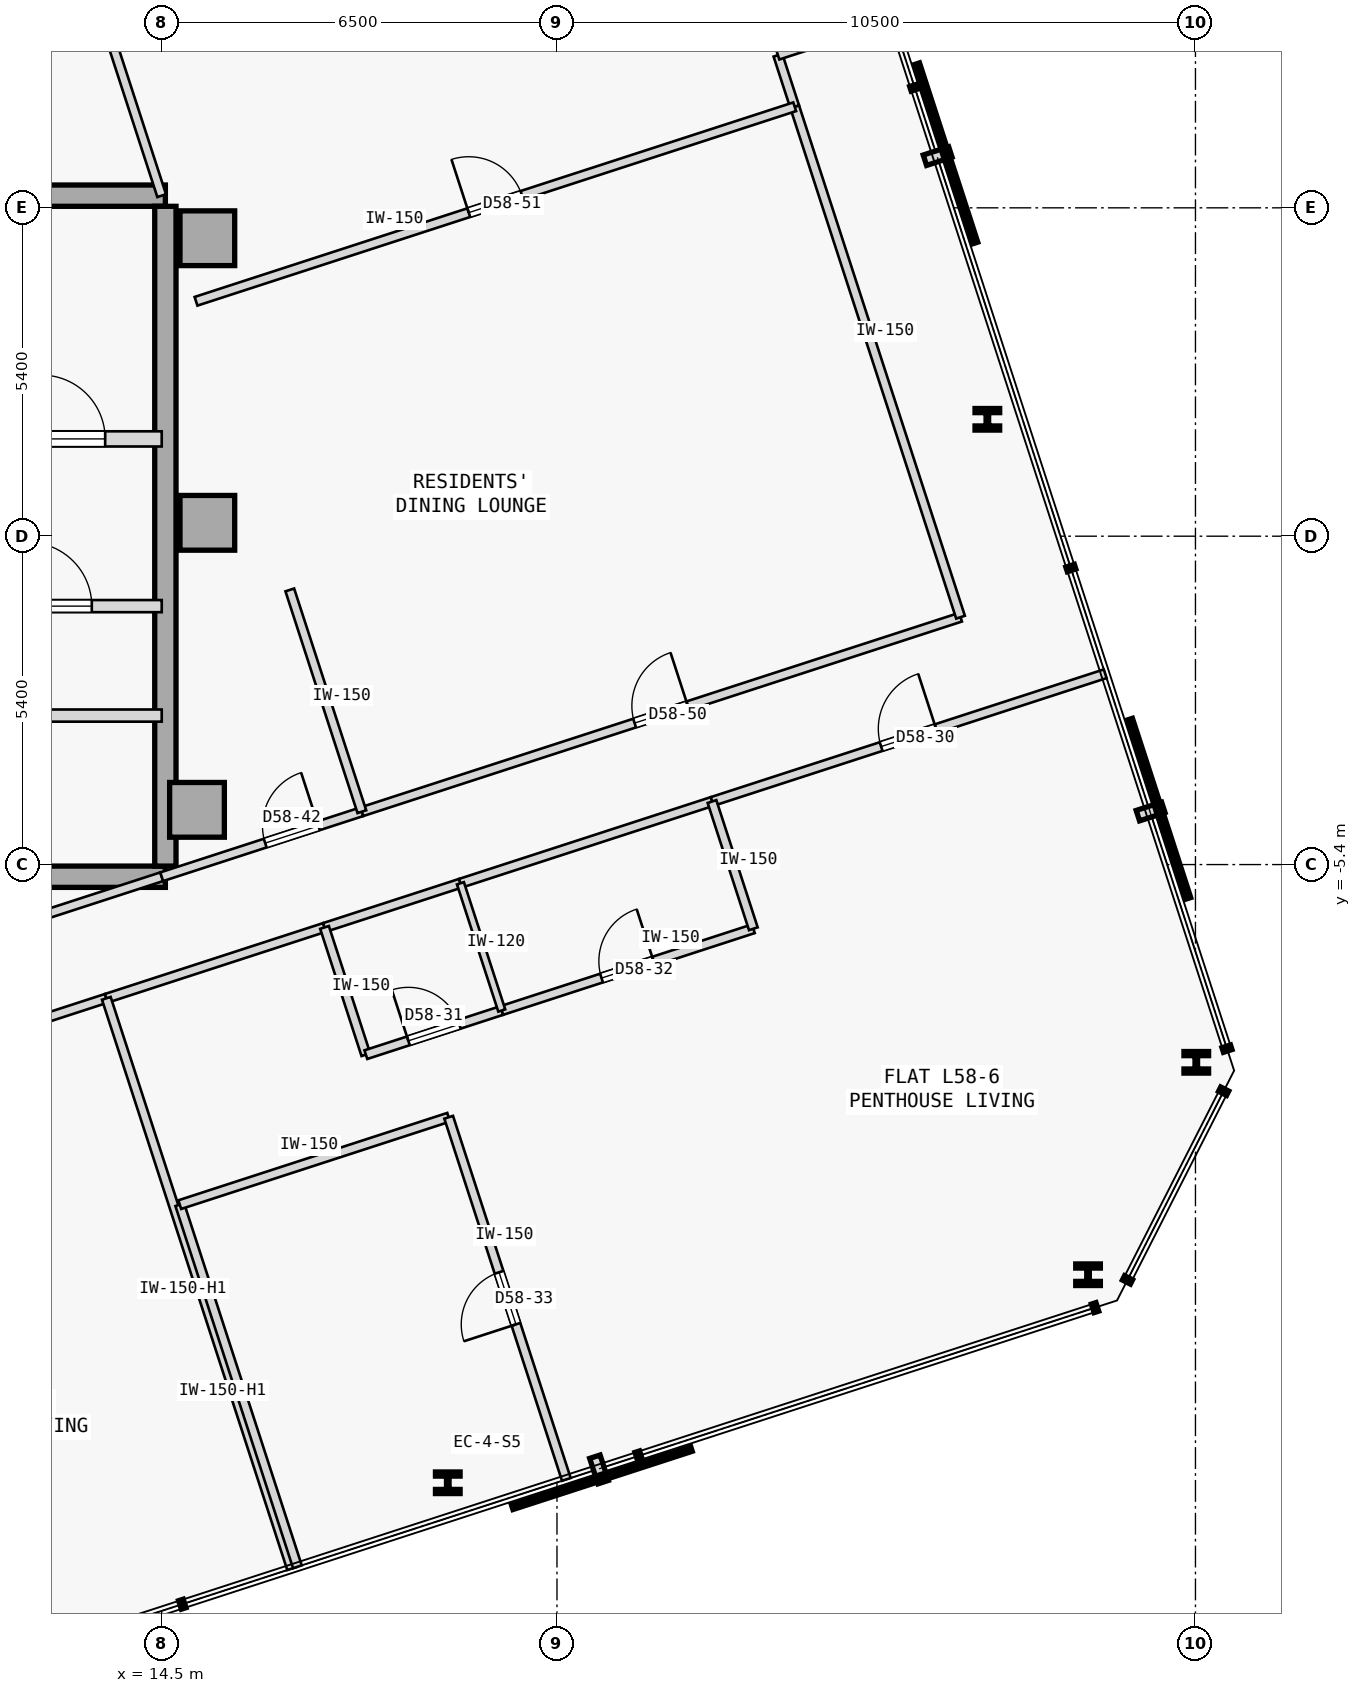
"""IFC4 building model, lengths in metres.
Left out: names, types, materials, properties, quantities, classifications, styles, units other than length and angle.
Written with IfcOpenShell. Run it as: python <this file> out.ifc"""

import sys

from ifc_helpers import new_model, si_unit, direction, frame, frame_2d, origin, origin_2d, place, context, subcontext, project, spatial, rectangle, i_section, extrude, element, fill, save


model = new_model("IFC4")
c1 = context("Model", 3, precision=1e-05, world=origin(), true_north=direction((0.0, 1.0)))
c2 = subcontext(c1, "Body", "Model", "MODEL_VIEW")
j1 = project(units=[si_unit("LENGTHUNIT", "METRE"), si_unit("PLANEANGLEUNIT", "RADIAN")], contexts=[c1])
p1 = place(None, origin())
s1 = spatial("IfcSite", under=j1, at=p1, CompositionType="ELEMENT")
p2 = place(p1, origin())
s2 = spatial("IfcBuilding", under=s1, at=p2, CompositionType="ELEMENT")
p3 = place(p2, frame((0.0, 0.0, 220.95)))
s3 = spatial("IfcBuildingStorey", under=s2, at=p3, CompositionType="ELEMENT", Elevation=220.95)
for number, where, z_axis, x_axis in (
    (1, (15.25, 4.9, 0.0), (0.0, 0.0, 1.0), (1.0, 0.0, 0.0)),
    (2, (15.25, 0.22, 0.0), (0.0, 0.0, 1.0), (1.0, 0.0, 0.0)),
    (3, (15.08, -4.5, 0.0), (0.0, 0.0, 1.0), (1.0, 0.0, 0.0)),
):
    element("IfcColumn", number, at=place(p3, frame(where, z_axis=z_axis, x_axis=x_axis)), inside=s3, PredefinedType="COLUMN", context=c2, shape_type="SweptSolid", body=[
        extrude(rectangle(XDim=0.9, YDim=0.9, at=origin_2d()), origin(), (0.0, 0.0, 1.0), 3.35),
    ])
p4 = place(p3, frame((3.15, 5.6, 0.0), z_axis=(0.0, 0.0, 1.0), x_axis=(1.0, 0.0, 0.0)))
e4 = element("IfcWall", 4, at=p4, inside=s3, PredefinedType="SHEAR", context=c2, shape_type="SweptSolid", body=[
    extrude(rectangle(XDim=11.41, YDim=0.35, at=frame_2d((5.705, 0.0))), origin(), (0.0, 0.0, 1.0), 3.125),
])
p5 = place(p3, frame((3.7, -5.6, 0.0), z_axis=(0.0, 0.0, 1.0), x_axis=(1.0, 0.0, 0.0)))
e5 = element("IfcWall", 5, at=p5, inside=s3, PredefinedType="SHEAR", context=c2, shape_type="SweptSolid", body=[
    extrude(rectangle(XDim=10.86, YDim=0.35, at=frame_2d((5.43, 0.0))), origin(), (0.0, 0.0, 1.0), 3.125),
])
p6 = place(p3, frame((14.56, -5.425, 0.0), z_axis=(0.0, 0.0, 1.0), x_axis=(0.0, 1.0, 0.0)))
e6 = element("IfcWall", 6, at=p6, inside=s3, PredefinedType="SHEAR", context=c2, shape_type="SweptSolid", body=[
    extrude(rectangle(XDim=10.85, YDim=0.35, at=frame_2d((5.425, 0.0))), origin(), (0.0, 0.0, 1.0), 3.125),
])
for number, where, z_axis, x_axis in (
    (7, (19.204, -15.566, 0.0), (0.0, 0.0, 1.0), (1.0, 0.0, 0.0)),
    (8, (29.734, -12.145, 0.0), (0.0, 0.0, 1.0), (1.0, 0.0, 0.0)),
    (9, (31.513, -8.652, 0.0), (0.0, 0.0, 1.0), (1.0, 0.0, 0.0)),
    (10, (28.078, 1.922, 0.0), (0.0, 0.0, 1.0), (1.0, 0.0, 0.0)),
):
    element("IfcColumn", number, at=place(p3, frame(where, z_axis=z_axis, x_axis=x_axis)), inside=s3, PredefinedType="COLUMN", context=c2, shape_type="SweptSolid", body=[
        extrude(i_section(OverallWidth=0.405, OverallDepth=0.355, WebThickness=0.042, FlangeThickness=0.068, FilletRadius=0.015, at=origin_2d()), origin(), (0.0, 0.0, 1.0), 3.35),
    ])
p7 = place(p3, frame((10.9, 1.6, 0.0), z_axis=(0.0, 0.0, 1.0), x_axis=(1.0, 0.0, 0.0)))
e11 = element("IfcWall", 11, at=p7, inside=s3, PredefinedType="STANDARD", context=c2, shape_type="SweptSolid", body=[
    extrude(rectangle(XDim=3.6, YDim=0.25, at=frame_2d((1.8, 0.0))), origin(), (0.0, 0.0, 1.0), 3.125),
])
p8 = place(p7, frame((1.62, 0.0, 0.0)))
e12 = element("IfcOpeningElement", 12, at=p8, cuts=e11, PredefinedType="OPENING", context=c2, shape_type="SweptSolid", body=[
    extrude(rectangle(XDim=1.05, YDim=2.15, at=frame_2d((0.525, 1.075))), frame((0.0, 0.135, 0.0), z_axis=(0.0, -1.0, 0.0), x_axis=(1.0, 0.0, 0.0)), (0.0, 0.0, 1.0), 0.27),
])
p9 = place(p3, frame((11.55, -1.15, 0.0), z_axis=(0.0, 0.0, 1.0), x_axis=(1.0, 0.0, 0.0)))
e13 = element("IfcWall", 13, at=p9, inside=s3, PredefinedType="STANDARD", context=c2, shape_type="SweptSolid", body=[
    extrude(rectangle(XDim=2.95, YDim=0.2, at=frame_2d((1.475, 0.0))), origin(), (0.0, 0.0, 1.0), 3.125),
])
p10 = place(p9, frame((0.75, 0.0, 0.0)))
e14 = element("IfcOpeningElement", 14, at=p10, cuts=e13, PredefinedType="OPENING", context=c2, shape_type="SweptSolid", body=[
    extrude(rectangle(XDim=1.05, YDim=2.18, at=frame_2d((0.525, 1.09))), frame((0.0, 0.11, 0.0), z_axis=(0.0, -1.0, 0.0), x_axis=(1.0, 0.0, 0.0)), (0.0, 0.0, 1.0), 0.22),
])
p11 = place(p3, frame((3.7, -2.95, 0.0), z_axis=(0.0, 0.0, 1.0), x_axis=(1.0, 0.0, 0.0)))
e15 = element("IfcWall", 15, at=p11, inside=s3, PredefinedType="STANDARD", context=c2, shape_type="SweptSolid", body=[
    extrude(rectangle(XDim=10.8, YDim=0.2, at=frame_2d((5.4, 0.0))), origin(), (0.0, 0.0, 1.0), 3.125),
])
p12 = place(p11, frame((0.53, 0.0, 0.0)))
e16 = element("IfcOpeningElement", 16, at=p12, cuts=e15, PredefinedType="OPENING", context=c2, shape_type="SweptSolid", body=[
    extrude(rectangle(XDim=1.1, YDim=2.15, at=frame_2d((0.55, 1.075))), frame((0.0, 0.11, 0.0), z_axis=(0.0, -1.0, 0.0), x_axis=(1.0, 0.0, 0.0)), (0.0, 0.0, 1.0), 0.22),
])
p13 = place(p11, frame((6.02, 0.0, 0.0)))
e17 = element("IfcOpeningElement", 17, at=p13, cuts=e15, PredefinedType="OPENING", context=c2, shape_type="SweptSolid", body=[
    extrude(rectangle(XDim=0.92, YDim=2.15, at=frame_2d((0.46, 1.075))), frame((0.0, 0.11, 0.0), z_axis=(0.0, -1.0, 0.0), x_axis=(1.0, 0.0, 0.0)), (0.0, 0.0, 1.0), 0.22),
])
p14 = place(p3, frame((8.744, -9.174, 0.0), z_axis=(0.0, 0.0, 1.0), x_axis=(0.95105238152, 0.309029719615, 0.0)))
e18 = element("IfcWall", 18, at=p14, inside=s3, PredefinedType="PARTITIONING", context=c2, shape_type="SweptSolid", body=[
    extrude(rectangle(XDim=5.094, YDim=0.15, at=frame_2d((2.547, 0.0))), origin(), (0.0, 0.0, 1.0), 3.125),
])
p15 = place(p14, frame((2.072, 0.0, 0.0)))
e19 = element("IfcOpeningElement", 19, at=p15, cuts=e18, PredefinedType="OPENING", context=c2, shape_type="SweptSolid", body=[
    extrude(rectangle(XDim=0.95, YDim=2.15, at=frame_2d((0.475, 1.075))), frame((0.0, 0.085, 0.0), z_axis=(0.0, -1.0, 0.0), x_axis=(1.0, 0.0, 0.0)), (0.0, 0.0, 1.0), 0.17),
])
p16 = place(p3, frame((13.589, -7.6, 0.0), z_axis=(0.0, 0.0, 1.0), x_axis=(0.95105023481, 0.30903632613, 0.0)))
e20 = element("IfcWall", 20, at=p16, inside=s3, PredefinedType="PARTITIONING", context=c2, shape_type="SweptSolid", body=[
    extrude(rectangle(XDim=3.773, YDim=0.15, at=frame_2d((1.886, 0.0))), origin(), (0.0, 0.0, 1.0), 3.125),
])
p17 = place(p3, frame((23.549, -4.363, 0.0), z_axis=(0.0, 0.0, 1.0), x_axis=(0.951054649174, 0.309022740723, 0.0)))
e21 = element("IfcWall", 21, at=p17, inside=s3, PredefinedType="PARTITIONING", context=c2, shape_type="SweptSolid", body=[
    extrude(rectangle(XDim=6.799, YDim=0.15, at=frame_2d((3.399, 0.0))), origin(), (0.0, 0.0, 1.0), 3.125),
])
p18 = place(p17, frame((2.925, 0.0, 0.0)))
e22 = element("IfcOpeningElement", 22, at=p18, cuts=e21, PredefinedType="OPENING", context=c2, shape_type="SweptSolid", body=[
    extrude(rectangle(XDim=0.95, YDim=2.15, at=frame_2d((0.475, 1.075))), frame((0.0, 0.085, 0.0), z_axis=(0.0, -1.0, 0.0), x_axis=(1.0, 0.0, 0.0)), (0.0, 0.0, 1.0), 0.17),
])
p19 = place(p3, frame((17.177, -6.434, 0.0), z_axis=(0.0, 0.0, 1.0), x_axis=(0.951066131077, 0.308987401554, 0.0)))
e23 = element("IfcWall", 23, at=p19, inside=s3, PredefinedType="PARTITIONING", context=c2, shape_type="SweptSolid", body=[
    extrude(rectangle(XDim=2.35, YDim=0.15, at=frame_2d((1.175, 0.0))), origin(), (0.0, 0.0, 1.0), 3.125),
])
p20 = place(p3, frame((19.412, -5.708, 0.0), z_axis=(0.0, 0.0, 1.0), x_axis=(0.951057987102, 0.309012467661, 0.0)))
e24 = element("IfcWall", 24, at=p20, inside=s3, PredefinedType="PARTITIONING", context=c2, shape_type="SweptSolid", body=[
    extrude(rectangle(XDim=4.35, YDim=0.15, at=frame_2d((2.175, 0.0))), origin(), (0.0, 0.0, 1.0), 3.125),
])
p21 = place(p3, frame((7.588, -7.846, 0.0), z_axis=(0.0, 0.0, 1.0), x_axis=(0.951058013903, 0.309012385174, 0.0)))
e25 = element("IfcWall", 25, at=p21, inside=s3, PredefinedType="PARTITIONING", context=c2, shape_type="SweptSolid", body=[
    extrude(rectangle(XDim=7.267, YDim=0.15, at=frame_2d((3.634, 0.0))), origin(), (0.0, 0.0, 1.0), 3.125),
])
p22 = place(p21, frame((0.557, 0.0, 0.0)))
e26 = element("IfcOpeningElement", 26, at=p22, cuts=e25, PredefinedType="OPENING", context=c2, shape_type="SweptSolid", body=[
    extrude(rectangle(XDim=0.92, YDim=2.15, at=frame_2d((0.46, 1.075))), frame((0.0, 0.085, 0.0), z_axis=(0.0, -1.0, 0.0), x_axis=(1.0, 0.0, 0.0)), (0.0, 0.0, 1.0), 0.17),
])
p23 = place(p3, frame((14.5, -5.6, 0.0), z_axis=(0.0, 0.0, 1.0), x_axis=(0.951047546178, 0.309044600193, 0.0)))
e27 = element("IfcWall", 27, at=p23, inside=s3, PredefinedType="PARTITIONING", context=c2, shape_type="SweptSolid", body=[
    extrude(rectangle(XDim=3.461, YDim=0.15, at=frame_2d((1.73, 0.0))), origin(), (0.0, 0.0, 1.0), 3.125),
])
p24 = place(p23, frame((1.79, 0.0, 0.0)))
e28 = element("IfcOpeningElement", 28, at=p24, cuts=e27, PredefinedType="OPENING", context=c2, shape_type="SweptSolid", body=[
    extrude(rectangle(XDim=0.92, YDim=2.15, at=frame_2d((0.46, 1.075))), frame((0.0, 0.085, 0.0), z_axis=(0.0, -1.0, 0.0), x_axis=(1.0, 0.0, 0.0)), (0.0, 0.0, 1.0), 0.17),
])
p25 = place(p3, frame((17.791, -4.531, 0.0), z_axis=(0.0, 0.0, 1.0), x_axis=(0.951056769902, 0.309016213852, 0.0)))
e29 = element("IfcWall", 29, at=p25, inside=s3, PredefinedType="PARTITIONING", context=c2, shape_type="SweptSolid", body=[
    extrude(rectangle(XDim=10.352, YDim=0.15, at=frame_2d((5.176, 0.0))), origin(), (0.0, 0.0, 1.0), 3.125),
])
p26 = place(p25, frame((4.716, 0.0, 0.0)))
e30 = element("IfcOpeningElement", 30, at=p26, cuts=e29, PredefinedType="OPENING", context=c2, shape_type="SweptSolid", body=[
    extrude(rectangle(XDim=0.92, YDim=2.15, at=frame_2d((0.46, 1.075))), frame((0.0, 0.085, 0.0), z_axis=(0.0, -1.0, 0.0), x_axis=(1.0, 0.0, 0.0)), (0.0, 0.0, 1.0), 0.17),
])
p27 = place(p3, frame((27.637, -1.332, 0.0), z_axis=(0.0, 0.0, 1.0), x_axis=(-0.309040411618, 0.951048907253, 0.0)))
e31 = element("IfcWall", 31, at=p27, inside=s3, PredefinedType="PARTITIONING", context=c2, shape_type="SweptSolid", body=[
    extrude(rectangle(XDim=8.826, YDim=0.15, at=frame_2d((4.413, 0.0))), origin(), (0.0, 0.0, 1.0), 3.125),
])
p28 = place(p3, frame((24.909, 7.062, 0.0), z_axis=(0.0, 0.0, 1.0), x_axis=(-0.30899324298, 0.951064233263, 0.0)))
e32 = element("IfcWall", 32, at=p28, inside=s3, PredefinedType="PARTITIONING", context=c2, shape_type="SweptSolid", body=[
    extrude(rectangle(XDim=0.892, YDim=0.15, at=frame_2d((0.446, 0.0))), origin(), (0.0, 0.0, 1.0), 3.125),
])
p29 = place(p3, frame((24.634, 7.91, 0.0), z_axis=(0.0, 0.0, 1.0), x_axis=(0.951054051148, 0.309024581215, 0.0)))
e33 = element("IfcWall", 33, at=p29, inside=s3, PredefinedType="PARTITIONING", context=c2, shape_type="SweptSolid", body=[
    extrude(rectangle(XDim=1.975, YDim=0.15, at=frame_2d((0.988, 0.0))), origin(), (0.0, 0.0, 1.0), 3.125),
])
p30 = place(p3, frame((16.636, -16.979, 0.0), z_axis=(0.0, 0.0, 1.0), x_axis=(-0.309022258842, 0.95105480575, 0.0)))
e34 = element("IfcWall", 34, at=p30, inside=s3, PredefinedType="PARTITIONING", context=c2, shape_type="SweptSolid", body=[
    extrude(rectangle(XDim=9.862, YDim=0.15, at=frame_2d((4.931, 0.0))), origin(), (0.0, 0.0, 1.0), 2.675),
])
p31 = place(p3, frame((17.857, -8.526, 0.0), z_axis=(0.0, 0.0, 1.0), x_axis=(-0.309060979314, 0.951042223598, 0.0)))
e35 = element("IfcWall", 35, at=p31, inside=s3, PredefinedType="PARTITIONING", context=c2, shape_type="SweptSolid", body=[
    extrude(rectangle(XDim=2.2, YDim=0.15, at=frame_2d((1.1, 0.0))), origin(), (0.0, 0.0, 1.0), 3.125),
])
p32 = place(p3, frame((17.857, -8.526, 0.0), z_axis=(0.0, 0.0, 1.0), x_axis=(0.951066131077, 0.308987401554, 0.0)))
e36 = element("IfcWall", 36, at=p32, inside=s3, PredefinedType="PARTITIONING", context=c2, shape_type="SweptSolid", body=[
    extrude(rectangle(XDim=2.35, YDim=0.15, at=frame_2d((1.175, 0.0))), origin(), (0.0, 0.0, 1.0), 3.125),
])
p33 = place(p32, frame((0.735, 0.0, 0.0)))
e37 = element("IfcOpeningElement", 37, at=p33, cuts=e36, PredefinedType="OPENING", context=c2, shape_type="SweptSolid", body=[
    extrude(rectangle(XDim=0.88, YDim=2.15, at=frame_2d((0.44, 1.075))), frame((0.0, 0.085, 0.0), z_axis=(0.0, -1.0, 0.0), x_axis=(1.0, 0.0, 0.0)), (0.0, 0.0, 1.0), 0.17),
])
p34 = place(p3, frame((20.092, -7.8, 0.0), z_axis=(0.0, 0.0, 1.0), x_axis=(0.951057987102, 0.309012467661, 0.0)))
e38 = element("IfcWall", 38, at=p34, inside=s3, PredefinedType="PARTITIONING", context=c2, shape_type="SweptSolid", body=[
    extrude(rectangle(XDim=4.35, YDim=0.15, at=frame_2d((2.175, 0.0))), origin(), (0.0, 0.0, 1.0), 3.125),
])
p35 = place(p34, frame((1.725, 0.0, 0.0)))
e39 = element("IfcOpeningElement", 39, at=p35, cuts=e38, PredefinedType="OPENING", context=c2, shape_type="SweptSolid", body=[
    extrude(rectangle(XDim=0.9, YDim=2.15, at=frame_2d((0.45, 1.075))), frame((0.0, 0.085, 0.0), z_axis=(0.0, -1.0, 0.0), x_axis=(1.0, 0.0, 0.0)), (0.0, 0.0, 1.0), 0.17),
])
p36 = place(p3, frame((24.229, -6.456, 0.0), z_axis=(0.0, 0.0, 1.0), x_axis=(-0.309060979314, 0.951042223598, 0.0)))
e40 = element("IfcWall", 40, at=p36, inside=s3, PredefinedType="PARTITIONING", context=c2, shape_type="SweptSolid", body=[
    extrude(rectangle(XDim=2.2, YDim=0.15, at=frame_2d((1.1, 0.0))), origin(), (0.0, 0.0, 1.0), 3.125),
])
p37 = place(p3, frame((16.731, -16.948, 0.0), z_axis=(0.0, 0.0, 1.0), x_axis=(-0.309013782848, 0.951057559777, 0.0)))
e41 = element("IfcWall", 41, at=p37, inside=s3, PredefinedType="PARTITIONING", context=c2, shape_type="SweptSolid", body=[
    extrude(rectangle(XDim=6.262, YDim=0.15, at=frame_2d((3.131, 0.0))), origin(), (0.0, 0.0, 1.0), 2.675),
])
p38 = place(p3, frame((14.796, -10.992, 0.0), z_axis=(0.0, 0.0, 1.0), x_axis=(0.951070715387, 0.308973290646, 0.0)))
e42 = element("IfcWall", 42, at=p38, inside=s3, PredefinedType="PARTITIONING", context=c2, shape_type="SweptSolid", body=[
    extrude(rectangle(XDim=4.65, YDim=0.15, at=frame_2d((2.325, 0.0))), origin(), (0.0, 0.0, 1.0), 3.125),
])
p39 = place(p3, frame((21.154, -15.511, 0.0), z_axis=(0.0, 0.0, 1.0), x_axis=(-0.30902524124, 0.951053836687, 0.0)))
e43 = element("IfcWall", 43, at=p39, inside=s3, PredefinedType="PARTITIONING", context=c2, shape_type="SweptSolid", body=[
    extrude(rectangle(XDim=6.262, YDim=0.15, at=frame_2d((3.131, 0.0))), origin(), (0.0, 0.0, 1.0), 3.125),
])
p40 = place(p39, frame((2.681, 0.0, 0.0)))
e44 = element("IfcOpeningElement", 44, at=p40, cuts=e43, PredefinedType="OPENING", context=c2, shape_type="SweptSolid", body=[
    extrude(rectangle(XDim=0.9, YDim=2.15, at=frame_2d((0.45, 1.075))), frame((0.0, 0.085, 0.0), z_axis=(0.0, -1.0, 0.0), x_axis=(1.0, 0.0, 0.0)), (0.0, 0.0, 1.0), 0.17),
])
p41 = place(p3, frame((20.092, -7.8, 0.0), z_axis=(0.0, 0.0, 1.0), x_axis=(-0.309060979314, 0.951042223598, 0.0)))
e45 = element("IfcWall", 45, at=p41, inside=s3, PredefinedType="PARTITIONING", context=c2, shape_type="SweptSolid", body=[
    extrude(rectangle(XDim=2.2, YDim=0.12, at=frame_2d((1.1, 0.0))), origin(), (0.0, 0.0, 1.0), 3.125),
])
p42 = place(p3, frame((17.791, -4.531, 0.0), z_axis=(0.0, 0.0, 1.0), x_axis=(-0.309018414265, 0.951056054944, 0.0)))
e46 = element("IfcWall", 46, at=p42, inside=s3, PredefinedType="PARTITIONING", context=c2, shape_type="SweptSolid", body=[
    extrude(rectangle(XDim=3.835, YDim=0.15, at=frame_2d((1.917, 0.0))), origin(), (0.0, 0.0, 1.0), 3.125),
])
p43 = place(p3, frame((14.5, 5.6, 0.0), z_axis=(0.0, 0.0, 1.0), x_axis=(-0.308974360462, 0.951070367837, 0.0)))
e47 = element("IfcWall", 47, at=p43, inside=s3, PredefinedType="PARTITIONING", context=c2, shape_type="SweptSolid", body=[
    extrude(rectangle(XDim=4.843, YDim=0.15, at=frame_2d((2.421, 0.0))), origin(), (0.0, 0.0, 1.0), 3.125),
])
p44 = place(p3, frame((15.064, 3.863, 0.0), z_axis=(0.0, 0.0, 1.0), x_axis=(0.951061448945, 0.309001812827, 0.0)))
e48 = element("IfcWall", 48, at=p44, inside=s3, PredefinedType="PARTITIONING", context=c2, shape_type="SweptSolid", body=[
    extrude(rectangle(XDim=10.352, YDim=0.15, at=frame_2d((5.176, 0.0))), origin(), (0.0, 0.0, 1.0), 3.125),
])
p45 = place(p44, frame((4.716, 0.0, 0.0)))
e49 = element("IfcOpeningElement", 49, at=p45, cuts=e48, PredefinedType="OPENING", context=c2, shape_type="SweptSolid", body=[
    extrude(rectangle(XDim=0.92, YDim=2.15, at=frame_2d((0.46, 1.075))), frame((0.0, 0.085, 0.0), z_axis=(0.0, -1.0, 0.0), x_axis=(1.0, 0.0, 0.0)), (0.0, 0.0, 1.0), 0.17),
])
p46 = place(p8, origin())
e50 = element("IfcDoor", 50, at=p46, inside=s3, OperationType="SINGLE_SWING_LEFT", PredefinedType="DOOR", context=c2, shape_type="SweptSolid", body=[
    extrude(rectangle(XDim=1.05, YDim=2.15, at=frame_2d((0.525, 1.075))), frame((0.0, 0.025, 0.0), z_axis=(0.0, -1.0, 0.0), x_axis=(1.0, 0.0, 0.0)), (0.0, 0.0, 1.0), 0.05),
])
fill(e12, e50)
p47 = place(p10, origin())
e51 = element("IfcDoor", 51, at=p47, inside=s3, OperationType="SINGLE_SWING_LEFT", PredefinedType="DOOR", context=c2, shape_type="SweptSolid", body=[
    extrude(rectangle(XDim=1.05, YDim=2.18, at=frame_2d((0.525, 1.09))), frame((0.0, 0.025, 0.0), z_axis=(0.0, -1.0, 0.0), x_axis=(1.0, 0.0, 0.0)), (0.0, 0.0, 1.0), 0.05),
])
fill(e14, e51)
p48 = place(p18, origin())
e52 = element("IfcDoor", 52, at=p48, inside=s3, OperationType="SINGLE_SWING_RIGHT", PredefinedType="DOOR", context=c2, shape_type="SweptSolid", body=[
    extrude(rectangle(XDim=0.95, YDim=2.15, at=frame_2d((0.475, 1.075))), frame((0.0, 0.025, 0.0), z_axis=(0.0, -1.0, 0.0), x_axis=(1.0, 0.0, 0.0)), (0.0, 0.0, 1.0), 0.05),
])
fill(e22, e52)
p49 = place(p33, origin())
e53 = element("IfcDoor", 53, at=p49, inside=s3, OperationType="SINGLE_SWING_LEFT", PredefinedType="DOOR", context=c2, shape_type="SweptSolid", body=[
    extrude(rectangle(XDim=0.88, YDim=2.15, at=frame_2d((0.44, 1.075))), frame((0.0, 0.025, 0.0), z_axis=(0.0, -1.0, 0.0), x_axis=(1.0, 0.0, 0.0)), (0.0, 0.0, 1.0), 0.05),
])
fill(e37, e53)
p50 = place(p35, origin())
e54 = element("IfcDoor", 54, at=p50, inside=s3, OperationType="SINGLE_SWING_RIGHT", PredefinedType="DOOR", context=c2, shape_type="SweptSolid", body=[
    extrude(rectangle(XDim=0.9, YDim=2.15, at=frame_2d((0.45, 1.075))), frame((0.0, 0.025, 0.0), z_axis=(0.0, -1.0, 0.0), x_axis=(1.0, 0.0, 0.0)), (0.0, 0.0, 1.0), 0.05),
])
fill(e39, e54)
p51 = place(p40, origin())
e55 = element("IfcDoor", 55, at=p51, inside=s3, OperationType="SINGLE_SWING_LEFT", PredefinedType="DOOR", context=c2, shape_type="SweptSolid", body=[
    extrude(rectangle(XDim=0.9, YDim=2.15, at=frame_2d((0.45, 1.075))), frame((0.0, 0.025, 0.0), z_axis=(0.0, -1.0, 0.0), x_axis=(1.0, 0.0, 0.0)), (0.0, 0.0, 1.0), 0.05),
])
fill(e44, e55)
p52 = place(p24, origin())
e56 = element("IfcDoor", 56, at=p52, inside=s3, OperationType="SINGLE_SWING_RIGHT", PredefinedType="DOOR", context=c2, shape_type="SweptSolid", body=[
    extrude(rectangle(XDim=0.92, YDim=2.15, at=frame_2d((0.46, 1.075))), frame((0.0, 0.025, 0.0), z_axis=(0.0, -1.0, 0.0), x_axis=(1.0, 0.0, 0.0)), (0.0, 0.0, 1.0), 0.05),
])
fill(e28, e56)
p53 = place(p26, origin())
e57 = element("IfcDoor", 57, at=p53, inside=s3, OperationType="SINGLE_SWING_RIGHT", PredefinedType="DOOR", context=c2, shape_type="SweptSolid", body=[
    extrude(rectangle(XDim=0.92, YDim=2.15, at=frame_2d((0.46, 1.075))), frame((0.0, 0.025, 0.0), z_axis=(0.0, -1.0, 0.0), x_axis=(1.0, 0.0, 0.0)), (0.0, 0.0, 1.0), 0.05),
])
fill(e30, e57)
p54 = place(p45, origin())
e58 = element("IfcDoor", 58, at=p54, inside=s3, OperationType="SINGLE_SWING_LEFT", PredefinedType="DOOR", context=c2, shape_type="SweptSolid", body=[
    extrude(rectangle(XDim=0.92, YDim=2.15, at=frame_2d((0.46, 1.075))), frame((0.0, 0.025, 0.0), z_axis=(0.0, -1.0, 0.0), x_axis=(1.0, 0.0, 0.0)), (0.0, 0.0, 1.0), 0.05),
])
fill(e49, e58)
save(model, sys.argv[1])
